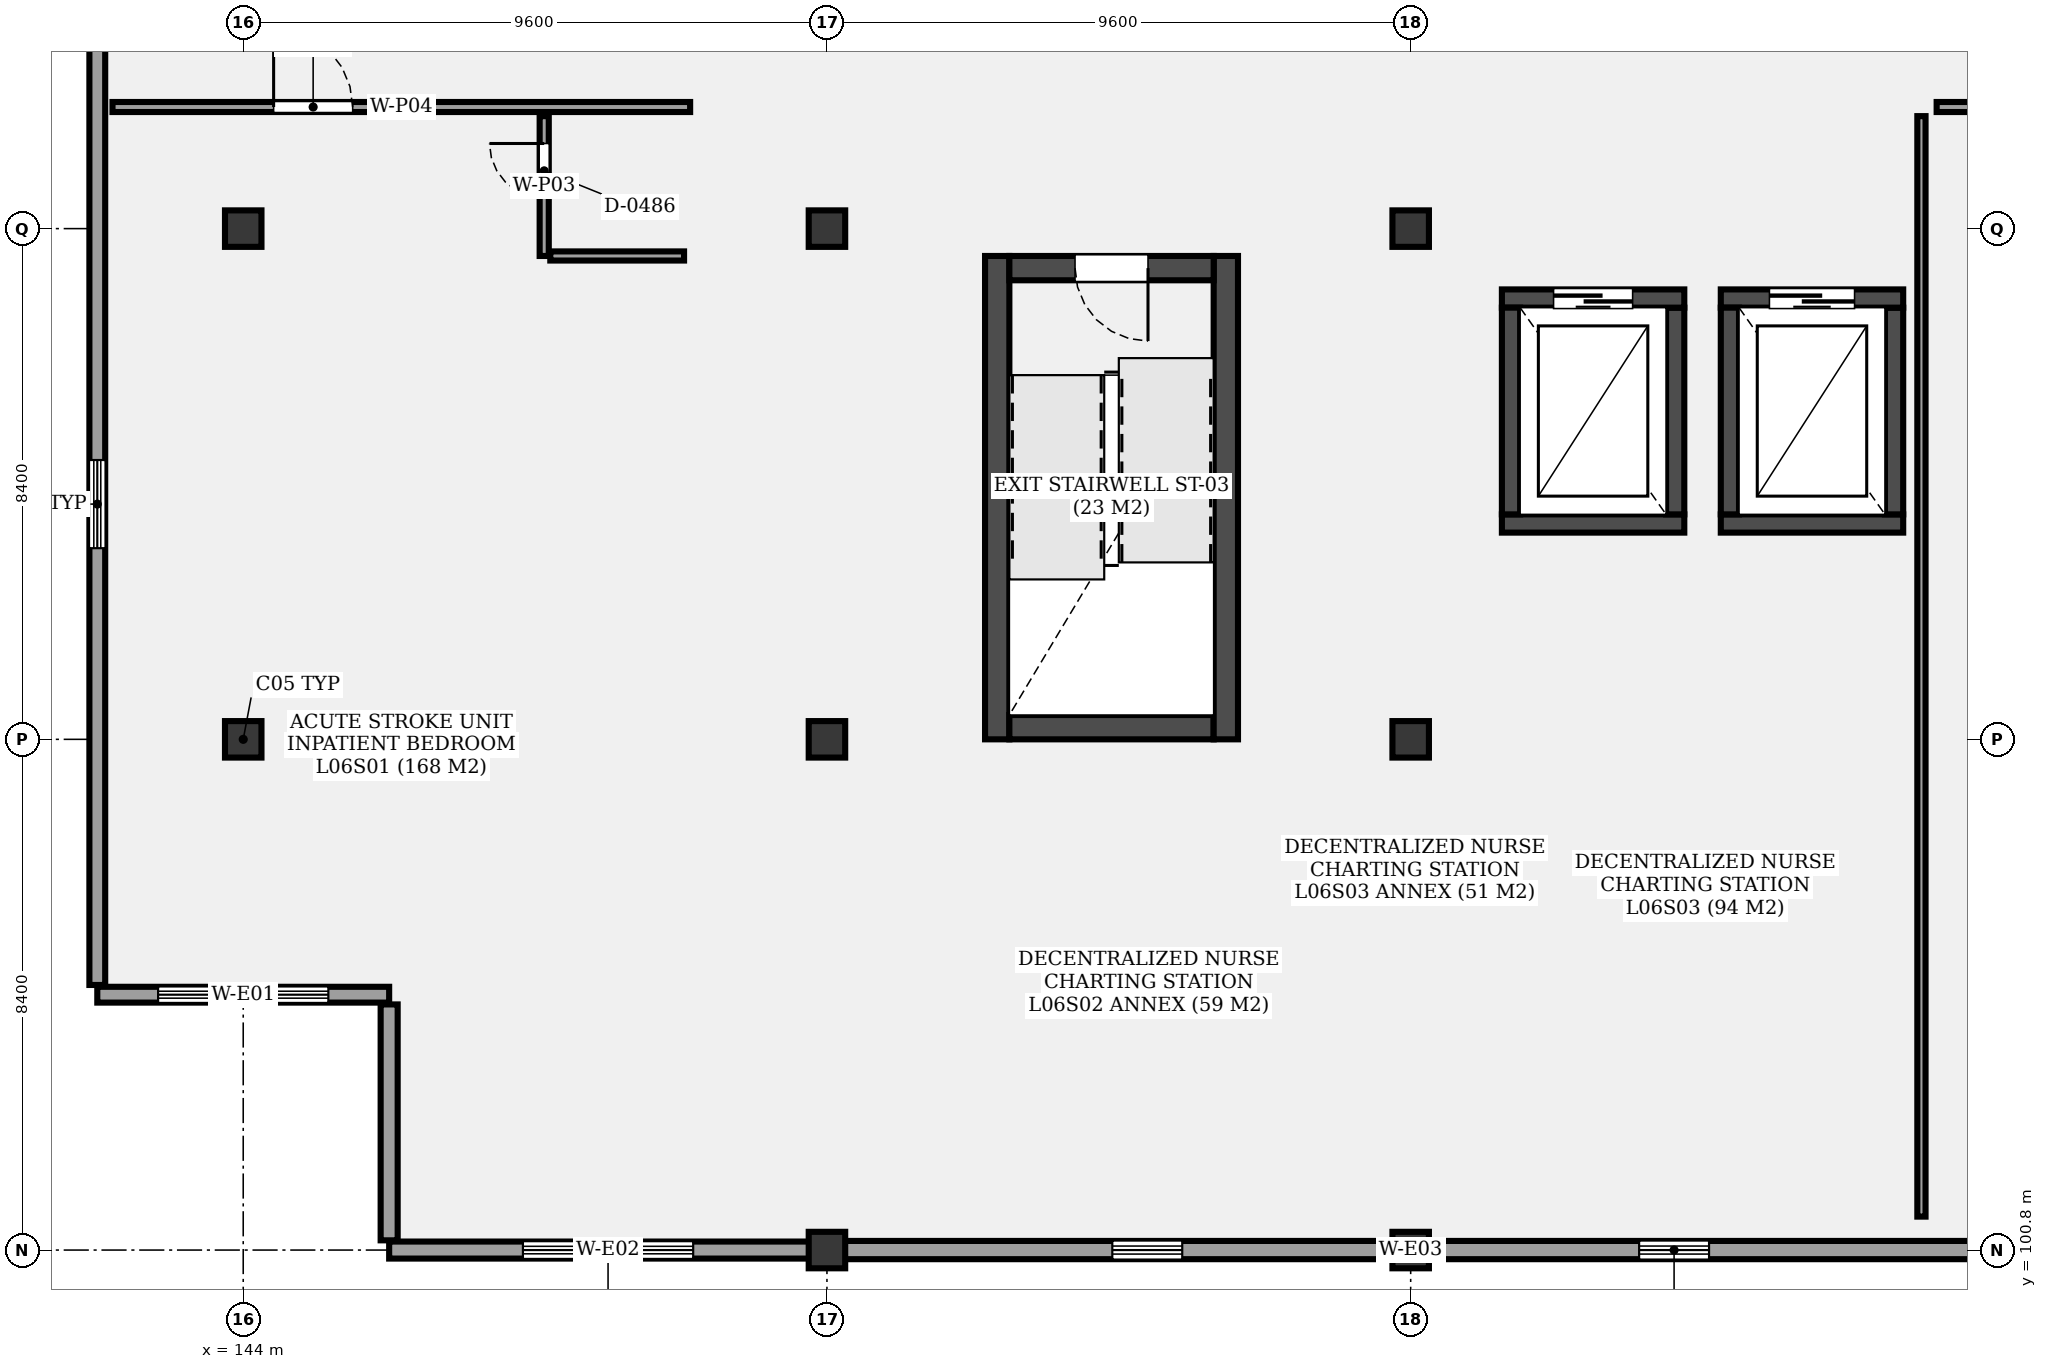
"""IFC4 building model, lengths in metres.
Left out: names, types, materials, properties, quantities, classifications, styles, units other than length and angle.
Written with IfcOpenShell. Run it as: python <this file> out.ifc"""

import sys

from ifc_helpers import new_model, si_unit, direction, frame, frame_2d, origin, origin_2d, place, context, subcontext, project, spatial, rectangle, extrude, element, fill, save


model = new_model("IFC4")
c1 = context("Model", 3, precision=1e-05, world=origin(), true_north=direction((0.0, 1.0)))
c2 = subcontext(c1, "Body", "Model", "MODEL_VIEW")
j1 = project(units=[si_unit("LENGTHUNIT", "METRE"), si_unit("PLANEANGLEUNIT", "RADIAN")], contexts=[c1])
p1 = place(None, origin())
s1 = spatial("IfcSite", under=j1, at=p1, CompositionType="ELEMENT")
p2 = place(p1, origin())
s2 = spatial("IfcBuilding", under=s1, at=p2, CompositionType="ELEMENT")
p3 = place(p2, frame((0.0, 0.0, 26.2)))
s3 = spatial("IfcBuildingStorey", under=s2, at=p3, CompositionType="ELEMENT", Elevation=26.2)
for number, where, z_axis, x_axis in (
    (1, (144.0, 109.2, 0.0), (0.0, 0.0, 1.0), (1.0, 0.0, 0.0)),
    (2, (144.0, 117.6, 0.0), (0.0, 0.0, 1.0), (1.0, 0.0, 0.0)),
    (3, (153.6, 100.8, 0.0), (0.0, 0.0, 1.0), (1.0, 0.0, 0.0)),
    (4, (153.6, 109.2, 0.0), (0.0, 0.0, 1.0), (1.0, 0.0, 0.0)),
    (5, (153.6, 117.6, 0.0), (0.0, 0.0, 1.0), (1.0, 0.0, 0.0)),
    (6, (163.2, 100.8, 0.0), (0.0, 0.0, 1.0), (1.0, 0.0, 0.0)),
    (7, (163.2, 109.2, 0.0), (0.0, 0.0, 1.0), (1.0, 0.0, 0.0)),
    (8, (163.2, 117.6, 0.0), (0.0, 0.0, 1.0), (1.0, 0.0, 0.0)),
):
    element("IfcColumn", number, at=place(p3, frame(where, z_axis=z_axis, x_axis=x_axis)), inside=s3, PredefinedType="COLUMN", context=c2, shape_type="SweptSolid", body=[
        extrude(rectangle(XDim=0.6, YDim=0.6, at=origin_2d()), origin(), (0.0, 0.0, 1.0), 4.2),
    ])
p4 = place(p3, frame((156.4, 117.15, 0.0), z_axis=(0.0, 0.0, 1.0), x_axis=(0.0, -1.0, 0.0)))
e9 = element("IfcWall", 9, at=p4, inside=s3, PredefinedType="SHEAR", context=c2, shape_type="SweptSolid", body=[
    extrude(rectangle(XDim=7.95, YDim=0.4, at=frame_2d((3.975, 0.0))), origin(), (0.0, 0.0, 1.0), 4.2),
])
p5 = place(p3, frame((156.6, 109.4, 0.0), z_axis=(0.0, 0.0, 1.0), x_axis=(1.0, 0.0, 0.0)))
e10 = element("IfcWall", 10, at=p5, inside=s3, PredefinedType="SHEAR", context=c2, shape_type="SweptSolid", body=[
    extrude(rectangle(XDim=3.36, YDim=0.4, at=frame_2d((1.68, 0.0))), origin(), (0.0, 0.0, 1.0), 4.2),
])
p6 = place(p3, frame((160.16, 109.2, 0.0), z_axis=(0.0, 0.0, 1.0), x_axis=(0.0, 1.0, 0.0)))
e11 = element("IfcWall", 11, at=p6, inside=s3, PredefinedType="SHEAR", context=c2, shape_type="SweptSolid", body=[
    extrude(rectangle(XDim=7.95, YDim=0.4, at=frame_2d((3.975, 0.0))), origin(), (0.0, 0.0, 1.0), 4.2),
])
p7 = place(p3, frame((159.96, 116.95, 0.0), z_axis=(0.0, 0.0, 1.0), x_axis=(-1.0, 0.0, 0.0)))
e12 = element("IfcWall", 12, at=p7, inside=s3, PredefinedType="SHEAR", context=c2, shape_type="SweptSolid", body=[
    extrude(rectangle(XDim=3.36, YDim=0.4, at=frame_2d((1.68, 0.0))), origin(), (0.0, 0.0, 1.0), 4.2),
])
p8 = place(p7, frame((1.08, 0.0, 0.0)))
e13 = element("IfcOpeningElement", 13, at=p8, cuts=e12, PredefinedType="OPENING", context=c2, shape_type="SweptSolid", body=[
    extrude(rectangle(XDim=1.2, YDim=2.2, at=frame_2d((0.6, 1.1))), frame((0.0, 0.21, 0.0), z_axis=(0.0, -1.0, 0.0), x_axis=(1.0, 0.0, 0.0)), (0.0, 0.0, 1.0), 0.42),
])
p9 = place(p3, frame((164.7, 112.75, 0.0), z_axis=(0.0, 0.0, 1.0), x_axis=(1.0, 0.0, 0.0)))
e14 = element("IfcWall", 14, at=p9, inside=s3, PredefinedType="SHEAR", context=c2, shape_type="SweptSolid", body=[
    extrude(rectangle(XDim=3.0, YDim=0.3, at=frame_2d((1.5, 0.0))), origin(), (0.0, 0.0, 1.0), 4.2),
])
p10 = place(p3, frame((167.55, 112.9, 0.0), z_axis=(0.0, 0.0, 1.0), x_axis=(0.0, 1.0, 0.0)))
e15 = element("IfcWall", 15, at=p10, inside=s3, PredefinedType="SHEAR", context=c2, shape_type="SweptSolid", body=[
    extrude(rectangle(XDim=3.4, YDim=0.3, at=frame_2d((1.7, 0.0))), origin(), (0.0, 0.0, 1.0), 4.2),
])
p11 = place(p3, frame((167.7, 116.45, 0.0), z_axis=(0.0, 0.0, 1.0), x_axis=(-1.0, 0.0, 0.0)))
e16 = element("IfcWall", 16, at=p11, inside=s3, PredefinedType="SHEAR", context=c2, shape_type="SweptSolid", body=[
    extrude(rectangle(XDim=3.0, YDim=0.3, at=frame_2d((1.5, 0.0))), origin(), (0.0, 0.0, 1.0), 4.2),
])
p12 = place(p11, frame((0.85, 0.0, 0.0)))
e17 = element("IfcOpeningElement", 17, at=p12, cuts=e16, PredefinedType="OPENING", context=c2, shape_type="SweptSolid", body=[
    extrude(rectangle(XDim=1.3, YDim=2.3, at=frame_2d((0.65, 1.15))), frame((0.0, 0.16, 0.0), z_axis=(0.0, -1.0, 0.0), x_axis=(1.0, 0.0, 0.0)), (0.0, 0.0, 1.0), 0.32),
])
p13 = place(p3, frame((164.85, 116.3, 0.0), z_axis=(0.0, 0.0, 1.0), x_axis=(0.0, -1.0, 0.0)))
e18 = element("IfcWall", 18, at=p13, inside=s3, PredefinedType="SHEAR", context=c2, shape_type="SweptSolid", body=[
    extrude(rectangle(XDim=3.4, YDim=0.3, at=frame_2d((1.7, 0.0))), origin(), (0.0, 0.0, 1.0), 4.2),
])
p14 = place(p3, frame((168.3, 112.75, 0.0), z_axis=(0.0, 0.0, 1.0), x_axis=(1.0, 0.0, 0.0)))
e19 = element("IfcWall", 19, at=p14, inside=s3, PredefinedType="SHEAR", context=c2, shape_type="SweptSolid", body=[
    extrude(rectangle(XDim=3.0, YDim=0.3, at=frame_2d((1.5, 0.0))), origin(), (0.0, 0.0, 1.0), 4.2),
])
p15 = place(p3, frame((171.15, 112.9, 0.0), z_axis=(0.0, 0.0, 1.0), x_axis=(0.0, 1.0, 0.0)))
e20 = element("IfcWall", 20, at=p15, inside=s3, PredefinedType="SHEAR", context=c2, shape_type="SweptSolid", body=[
    extrude(rectangle(XDim=3.4, YDim=0.3, at=frame_2d((1.7, 0.0))), origin(), (0.0, 0.0, 1.0), 4.2),
])
p16 = place(p3, frame((171.3, 116.45, 0.0), z_axis=(0.0, 0.0, 1.0), x_axis=(-1.0, 0.0, 0.0)))
e21 = element("IfcWall", 21, at=p16, inside=s3, PredefinedType="SHEAR", context=c2, shape_type="SweptSolid", body=[
    extrude(rectangle(XDim=3.0, YDim=0.3, at=frame_2d((1.5, 0.0))), origin(), (0.0, 0.0, 1.0), 4.2),
])
p17 = place(p16, frame((0.8, 0.0, 0.0)))
e22 = element("IfcOpeningElement", 22, at=p17, cuts=e21, PredefinedType="OPENING", context=c2, shape_type="SweptSolid", body=[
    extrude(rectangle(XDim=1.4, YDim=2.3, at=frame_2d((0.7, 1.15))), frame((0.0, 0.16, 0.0), z_axis=(0.0, -1.0, 0.0), x_axis=(1.0, 0.0, 0.0)), (0.0, 0.0, 1.0), 0.32),
])
p18 = place(p3, frame((168.45, 116.3, 0.0), z_axis=(0.0, 0.0, 1.0), x_axis=(0.0, -1.0, 0.0)))
e23 = element("IfcWall", 23, at=p18, inside=s3, PredefinedType="SHEAR", context=c2, shape_type="SweptSolid", body=[
    extrude(rectangle(XDim=3.4, YDim=0.3, at=frame_2d((1.7, 0.0))), origin(), (0.0, 0.0, 1.0), 4.2),
])
p19 = place(p3, frame((153.6, 100.8, 0.0), z_axis=(0.0, 0.0, 1.0), x_axis=(-1.0, 0.0, 0.0)))
e24 = element("IfcWall", 24, at=p19, inside=s3, PredefinedType="SOLIDWALL", context=c2, shape_type="SweptSolid", body=[
    extrude(rectangle(XDim=7.2, YDim=0.28, at=frame_2d((3.6, 0.0))), origin(), (0.0, 0.0, 1.0), 3.39),
])
p20 = place(p19, frame((2.2, 0.0, 0.85)))
e25 = element("IfcOpeningElement", 25, at=p20, cuts=e24, PredefinedType="OPENING", context=c2, shape_type="SweptSolid", body=[
    extrude(rectangle(XDim=2.8, YDim=1.4, at=frame_2d((1.4, 0.7))), frame((0.0, 0.15, 0.0), z_axis=(0.0, -1.0, 0.0), x_axis=(1.0, 0.0, 0.0)), (0.0, 0.0, 1.0), 0.3),
])
p21 = place(p3, frame((172.8, 100.8, 0.0), z_axis=(0.0, 0.0, 1.0), x_axis=(-1.0, 0.0, 0.0)))
e26 = element("IfcWall", 26, at=p21, inside=s3, PredefinedType="SOLIDWALL", context=c2, shape_type="SweptSolid", body=[
    extrude(rectangle(XDim=19.2, YDim=0.3, at=frame_2d((9.6, 0.0))), origin(), (0.0, 0.0, 1.0), 3.39),
])
p22 = place(p21, frame((4.693, 0.0, 0.85)))
e27 = element("IfcOpeningElement", 27, at=p22, cuts=e26, PredefinedType="OPENING", context=c2, shape_type="SweptSolid", body=[
    extrude(rectangle(XDim=1.15, YDim=1.6, at=frame_2d((0.575, 0.8))), frame((0.0, 0.16, 0.0), z_axis=(0.0, -1.0, 0.0), x_axis=(1.0, 0.0, 0.0)), (0.0, 0.0, 1.0), 0.32),
])
p23 = place(p21, frame((13.357, 0.0, 0.85)))
e28 = element("IfcOpeningElement", 28, at=p23, cuts=e26, PredefinedType="OPENING", context=c2, shape_type="SweptSolid", body=[
    extrude(rectangle(XDim=1.15, YDim=1.6, at=frame_2d((0.575, 0.8))), frame((0.0, 0.16, 0.0), z_axis=(0.0, -1.0, 0.0), x_axis=(1.0, 0.0, 0.0)), (0.0, 0.0, 1.0), 0.32),
])
p24 = place(p3, frame((146.4, 105.0, 0.0), z_axis=(0.0, 0.0, 1.0), x_axis=(-1.0, 0.0, 0.0)))
e29 = element("IfcWall", 29, at=p24, inside=s3, PredefinedType="SOLIDWALL", context=c2, shape_type="SweptSolid", body=[
    extrude(rectangle(XDim=4.8, YDim=0.26, at=frame_2d((2.4, 0.0))), origin(), (0.0, 0.0, 1.0), 3.39),
])
p25 = place(p24, frame((1.0, 0.0, 0.85)))
e30 = element("IfcOpeningElement", 30, at=p25, cuts=e29, PredefinedType="OPENING", context=c2, shape_type="SweptSolid", body=[
    extrude(rectangle(XDim=2.8, YDim=1.4, at=frame_2d((1.4, 0.7))), frame((0.0, 0.14, 0.0), z_axis=(0.0, -1.0, 0.0), x_axis=(1.0, 0.0, 0.0)), (0.0, 0.0, 1.0), 0.28),
])
p26 = place(p3, frame((141.6, 105.16, 0.0), z_axis=(0.0, 0.0, 1.0), x_axis=(0.0, 1.0, 0.0)))
e31 = element("IfcWall", 31, at=p26, inside=s3, PredefinedType="SOLIDWALL", context=c2, shape_type="SweptSolid", body=[
    extrude(rectangle(XDim=29.08, YDim=0.26, at=frame_2d((14.54, 0.0))), origin(), (0.0, 0.0, 1.0), 3.39),
])
p27 = place(p26, frame((7.184, 0.0, 0.85)))
e32 = element("IfcOpeningElement", 32, at=p27, cuts=e31, PredefinedType="OPENING", context=c2, shape_type="SweptSolid", body=[
    extrude(rectangle(XDim=1.45, YDim=1.6, at=frame_2d((0.725, 0.8))), frame((0.0, 0.14, 0.0), z_axis=(0.0, -1.0, 0.0), x_axis=(1.0, 0.0, 0.0)), (0.0, 0.0, 1.0), 0.28),
])
p28 = place(p26, frame((20.446, 0.0, 0.85)))
e33 = element("IfcOpeningElement", 33, at=p28, cuts=e31, PredefinedType="OPENING", context=c2, shape_type="SweptSolid", body=[
    extrude(rectangle(XDim=1.45, YDim=1.6, at=frame_2d((0.725, 0.8))), frame((0.0, 0.14, 0.0), z_axis=(0.0, -1.0, 0.0), x_axis=(1.0, 0.0, 0.0)), (0.0, 0.0, 1.0), 0.28),
])
p29 = place(p3, frame((146.4, 100.96, 0.0), z_axis=(0.0, 0.0, 1.0), x_axis=(0.0, 1.0, 0.0)))
e34 = element("IfcWall", 34, at=p29, inside=s3, PredefinedType="SOLIDWALL", context=c2, shape_type="SweptSolid", body=[
    extrude(rectangle(XDim=3.88, YDim=0.28, at=frame_2d((1.94, 0.0))), origin(), (0.0, 0.0, 1.0), 3.39),
])
p30 = place(p3, frame((141.85, 119.6, 0.0), z_axis=(0.0, 0.0, 1.0), x_axis=(1.0, 0.0, 0.0)))
e35 = element("IfcWall", 35, at=p30, inside=s3, PredefinedType="PARTITIONING", context=c2, shape_type="SweptSolid", body=[
    extrude(rectangle(XDim=9.5, YDim=0.165, at=frame_2d((4.75, 0.0))), origin(), (0.0, 0.0, 1.0), 3.3),
])
p31 = place(p30, frame((2.65, 0.0, 0.0)))
e36 = element("IfcOpeningElement", 36, at=p31, cuts=e35, PredefinedType="OPENING", context=c2, shape_type="SweptSolid", body=[
    extrude(rectangle(XDim=1.3, YDim=2.2, at=frame_2d((0.65, 1.1))), frame((0.0, 0.093, 0.0), z_axis=(0.0, -1.0, 0.0), x_axis=(1.0, 0.0, 0.0)), (0.0, 0.0, 1.0), 0.185),
])
p32 = place(p3, frame((148.95, 117.15, 0.0), z_axis=(0.0, 0.0, 1.0), x_axis=(0.0, 1.0, 0.0)))
e37 = element("IfcWall", 37, at=p32, inside=s3, PredefinedType="PARTITIONING", context=c2, shape_type="SweptSolid", body=[
    extrude(rectangle(XDim=2.3, YDim=0.15, at=frame_2d((1.15, 0.0))), origin(), (0.0, 0.0, 1.0), 3.3),
])
p33 = place(p32, frame((0.95, 0.0, 0.0)))
e38 = element("IfcOpeningElement", 38, at=p33, cuts=e37, PredefinedType="OPENING", context=c2, shape_type="SweptSolid", body=[
    extrude(rectangle(XDim=0.9, YDim=2.1, at=frame_2d((0.45, 1.05))), frame((0.0, 0.085, 0.0), z_axis=(0.0, -1.0, 0.0), x_axis=(1.0, 0.0, 0.0)), (0.0, 0.0, 1.0), 0.17),
])
p34 = place(p3, frame((149.05, 117.15, 0.0), z_axis=(0.0, 0.0, 1.0), x_axis=(1.0, 0.0, 0.0)))
e39 = element("IfcWall", 39, at=p34, inside=s3, PredefinedType="PARTITIONING", context=c2, shape_type="SweptSolid", body=[
    extrude(rectangle(XDim=2.2, YDim=0.15, at=frame_2d((1.1, 0.0))), origin(), (0.0, 0.0, 1.0), 3.3),
])
p35 = place(p3, frame((171.85, 119.6, 0.0), z_axis=(0.0, 0.0, 1.0), x_axis=(1.0, 0.0, 0.0)))
e40 = element("IfcWall", 40, at=p35, inside=s3, PredefinedType="PARTITIONING", context=c2, shape_type="SweptSolid", body=[
    extrude(rectangle(XDim=9.5, YDim=0.165, at=frame_2d((4.75, 0.0))), origin(), (0.0, 0.0, 1.0), 3.3),
])
p36 = place(p35, frame((2.65, 0.0, 0.0)))
e41 = element("IfcOpeningElement", 41, at=p36, cuts=e40, PredefinedType="OPENING", context=c2, shape_type="SweptSolid", body=[
    extrude(rectangle(XDim=1.25, YDim=2.2, at=frame_2d((0.625, 1.1))), frame((0.0, 0.093, 0.0), z_axis=(0.0, -1.0, 0.0), x_axis=(1.0, 0.0, 0.0)), (0.0, 0.0, 1.0), 0.185),
])
p37 = place(p3, frame((171.6, 101.35, 0.0), z_axis=(0.0, 0.0, 1.0), x_axis=(0.0, 1.0, 0.0)))
e42 = element("IfcWall", 42, at=p37, inside=s3, PredefinedType="PARTITIONING", context=c2, shape_type="SweptSolid", body=[
    extrude(rectangle(XDim=18.1, YDim=0.135, at=frame_2d((9.05, 0.0))), origin(), (0.0, 0.0, 1.0), 3.3),
])
p38 = place(p8, origin())
e43 = element("IfcDoor", 43, at=p38, inside=s3, OperationType="SINGLE_SWING_LEFT", PredefinedType="DOOR", context=c2, shape_type="SweptSolid", body=[
    extrude(rectangle(XDim=1.2, YDim=2.2, at=frame_2d((0.6, 1.1))), frame((0.0, 0.025, 0.0), z_axis=(0.0, -1.0, 0.0), x_axis=(1.0, 0.0, 0.0)), (0.0, 0.0, 1.0), 0.05),
])
fill(e13, e43)
p39 = place(p12, origin())
e44 = element("IfcDoor", 44, at=p39, inside=s3, OperationType="SLIDING_TO_LEFT", PredefinedType="DOOR", context=c2, shape_type="SweptSolid", body=[
    extrude(rectangle(XDim=1.3, YDim=2.3, at=frame_2d((0.65, 1.15))), frame((0.0, 0.025, 0.0), z_axis=(0.0, -1.0, 0.0), x_axis=(1.0, 0.0, 0.0)), (0.0, 0.0, 1.0), 0.05),
])
fill(e17, e44)
p40 = place(p17, origin())
e45 = element("IfcDoor", 45, at=p40, inside=s3, OperationType="SLIDING_TO_RIGHT", PredefinedType="DOOR", context=c2, shape_type="SweptSolid", body=[
    extrude(rectangle(XDim=1.4, YDim=2.3, at=frame_2d((0.7, 1.15))), frame((0.0, 0.025, 0.0), z_axis=(0.0, -1.0, 0.0), x_axis=(1.0, 0.0, 0.0)), (0.0, 0.0, 1.0), 0.05),
])
fill(e22, e45)
p41 = place(p20, origin())
e46 = element("IfcWindow", 46, at=p41, inside=s3, PartitioningType="SINGLE_PANEL", PredefinedType="WINDOW", context=c2, shape_type="SweptSolid", body=[
    extrude(rectangle(XDim=2.8, YDim=1.4, at=frame_2d((1.4, 0.7))), frame((0.0, 0.03, 0.0), z_axis=(0.0, -1.0, 0.0), x_axis=(1.0, 0.0, 0.0)), (0.0, 0.0, 1.0), 0.06),
])
fill(e25, e46)
p42 = place(p22, origin())
e47 = element("IfcWindow", 47, at=p42, inside=s3, PartitioningType="SINGLE_PANEL", PredefinedType="WINDOW", context=c2, shape_type="SweptSolid", body=[
    extrude(rectangle(XDim=1.15, YDim=1.6, at=frame_2d((0.575, 0.8))), frame((0.0, 0.03, 0.0), z_axis=(0.0, -1.0, 0.0), x_axis=(1.0, 0.0, 0.0)), (0.0, 0.0, 1.0), 0.06),
])
fill(e27, e47)
p43 = place(p23, origin())
e48 = element("IfcWindow", 48, at=p43, inside=s3, PartitioningType="SINGLE_PANEL", PredefinedType="WINDOW", context=c2, shape_type="SweptSolid", body=[
    extrude(rectangle(XDim=1.15, YDim=1.6, at=frame_2d((0.575, 0.8))), frame((0.0, 0.03, 0.0), z_axis=(0.0, -1.0, 0.0), x_axis=(1.0, 0.0, 0.0)), (0.0, 0.0, 1.0), 0.06),
])
fill(e28, e48)
p44 = place(p25, origin())
e49 = element("IfcWindow", 49, at=p44, inside=s3, PartitioningType="SINGLE_PANEL", PredefinedType="WINDOW", context=c2, shape_type="SweptSolid", body=[
    extrude(rectangle(XDim=2.8, YDim=1.4, at=frame_2d((1.4, 0.7))), frame((0.0, 0.03, 0.0), z_axis=(0.0, -1.0, 0.0), x_axis=(1.0, 0.0, 0.0)), (0.0, 0.0, 1.0), 0.06),
])
fill(e30, e49)
p45 = place(p27, origin())
e50 = element("IfcWindow", 50, at=p45, inside=s3, PartitioningType="SINGLE_PANEL", PredefinedType="WINDOW", context=c2, shape_type="SweptSolid", body=[
    extrude(rectangle(XDim=1.45, YDim=1.6, at=frame_2d((0.725, 0.8))), frame((0.0, 0.03, 0.0), z_axis=(0.0, -1.0, 0.0), x_axis=(1.0, 0.0, 0.0)), (0.0, 0.0, 1.0), 0.06),
])
fill(e32, e50)
p46 = place(p31, origin())
e51 = element("IfcDoor", 51, at=p46, inside=s3, OperationType="SINGLE_SWING_LEFT", PredefinedType="DOOR", context=c2, shape_type="SweptSolid", body=[
    extrude(rectangle(XDim=1.3, YDim=2.2, at=frame_2d((0.65, 1.1))), frame((0.0, 0.025, 0.0), z_axis=(0.0, -1.0, 0.0), x_axis=(1.0, 0.0, 0.0)), (0.0, 0.0, 1.0), 0.05),
])
fill(e36, e51)
p47 = place(p33, origin())
e52 = element("IfcDoor", 52, at=p47, inside=s3, OperationType="SINGLE_SWING_RIGHT", PredefinedType="DOOR", context=c2, shape_type="SweptSolid", body=[
    extrude(rectangle(XDim=0.9, YDim=2.1, at=frame_2d((0.45, 1.05))), frame((0.0, 0.025, 0.0), z_axis=(0.0, -1.0, 0.0), x_axis=(1.0, 0.0, 0.0)), (0.0, 0.0, 1.0), 0.05),
])
fill(e38, e52)
save(model, sys.argv[1])
